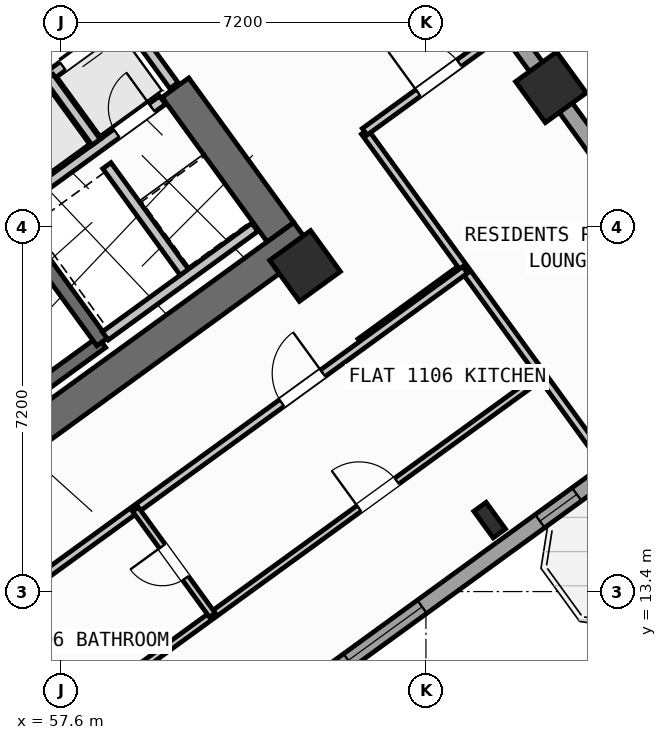
"""IFC4 building model, lengths in metres.
Left out: names, types, materials, properties, quantities, classifications, styles, units other than length and angle.
Written with IfcOpenShell. Run it as: python <this file> out.ifc"""

import sys

from ifc_helpers import new_model, si_unit, direction, frame, frame_2d, origin, origin_2d, place, context, subcontext, project, spatial, rectangle, hollow_rectangle, i_section, extrude, source, transform, mapped, element, fill, save


model = new_model("IFC4")
c1 = context("Model", 3, precision=1e-05, world=origin(), true_north=direction((0.0, 1.0)))
c2 = subcontext(c1, "Body", "Model", "MODEL_VIEW")
j1 = project(units=[si_unit("LENGTHUNIT", "METRE"), si_unit("PLANEANGLEUNIT", "RADIAN")], contexts=[c1])
p1 = place(None, origin())
s1 = spatial("IfcSite", under=j1, at=p1, CompositionType="ELEMENT")
p2 = place(p1, origin())
s2 = spatial("IfcBuilding", under=s1, at=p2, CompositionType="ELEMENT")
p3 = place(p2, frame((0.0, 0.0, 45.6)))
s3 = spatial("IfcBuildingStorey", under=s2, at=p3, CompositionType="ELEMENT", Elevation=45.6)
p4 = place(p3, frame((52.318, 13.11, 0.0), z_axis=(0.0, 0.0, 1.0), x_axis=(0.809019445368, 0.587781878776, 0.0)))
e1 = element("IfcWall", 1, at=p4, inside=s3, PredefinedType="SHEAR", context=c2, shape_type="SweptSolid", body=[
    extrude(rectangle(XDim=12.44, YDim=0.65, at=frame_2d((6.22, 0.0))), origin(), (0.0, 0.0, 1.0), 3.35),
])
p5 = place(p3, frame((61.929, 20.494, 0.0), z_axis=(0.0, 0.0, 1.0), x_axis=(-0.58782982593, 0.808984607855, 0.0)))
e2 = element("IfcWall", 2, at=p5, inside=s3, PredefinedType="SHEAR", context=c2, shape_type="SweptSolid", body=[
    extrude(rectangle(XDim=3.525, YDim=0.65, at=frame_2d((1.762, 0.0))), origin(), (0.0, 0.0, 1.0), 3.35),
])
m1 = source(origin(), c2, "Body", "SweptSolid", [
    extrude(i_section(OverallWidth=0.3, OverallDepth=0.65, WebThickness=0.016, FlangeThickness=0.031, at=origin_2d()), origin(), (0.0, 0.0, 1.0), 3.6),
])
p6 = place(p3, frame((66.058, 14.811, 0.0), z_axis=(0.0, 0.0, 1.0), x_axis=(0.809016994375, 0.587785252292, 0.0)))
e3 = element("IfcColumn", 3, at=p6, inside=s3, PredefinedType="COLUMN", context=c2, shape_type="MappedRepresentation", body=[
    mapped(m1, transform((0.0, 0.0, 0.0), scale=1.0)),
])
m2 = source(origin(), c2, "Body", "SweptSolid", [
    extrude(hollow_rectangle(XDim=1.0, YDim=1.0, WallThickness=0.04, at=origin_2d()), origin(), (0.0, 0.0, 1.0), 3.6),
])
for number, where, z_axis, x_axis in (
    (4, (62.414, 19.827, 0.0), (0.0, 0.0, 1.0), (0.809, 0.588, 0.0)),
    (5, (67.268, 23.354, 0.0), (0.0, 0.0, 1.0), (0.809, 0.588, 0.0)),
):
    element("IfcColumn", number, at=place(p3, frame(where, z_axis=z_axis, x_axis=x_axis)), inside=s3, PredefinedType="COLUMN", context=c2, shape_type="MappedRepresentation", body=[
        mapped(m2, transform((0.0, 0.0, 0.0), scale=1.0)),
    ])
p7 = place(p3, frame((58.455, 35.484, 0.0), z_axis=(0.0, 0.0, 1.0), x_axis=(0.587783625747, -0.809018176127, 0.0)))
e6 = element("IfcWall", 6, at=p7, inside=s3, PredefinedType="STANDARD", context=c2, shape_type="SweptSolid", body=[
    extrude(rectangle(XDim=21.587, YDim=0.32, at=frame_2d((10.794, 0.0))), origin(), (0.0, 0.0, 1.0), 2.725),
])
p8 = place(p7, frame((1.5, 0.0, 0.8)))
e7 = element("IfcOpeningElement", 7, at=p8, cuts=e6, PredefinedType="OPENING", context=c2, shape_type="SweptSolid", body=[
    extrude(rectangle(XDim=2.1, YDim=1.55, at=frame_2d((1.05, 0.775))), frame((0.0, 0.17, 0.0), z_axis=(0.0, -1.0, 0.0), x_axis=(1.0, 0.0, 0.0)), (0.0, 0.0, 1.0), 0.34),
])
p9 = place(p7, frame((5.105, 0.0, 0.85)))
e8 = element("IfcOpeningElement", 8, at=p9, cuts=e6, PredefinedType="OPENING", context=c2, shape_type="SweptSolid", body=[
    extrude(rectangle(XDim=1.5, YDim=1.5, at=frame_2d((0.75, 0.75))), frame((0.0, 0.17, 0.0), z_axis=(0.0, -1.0, 0.0), x_axis=(1.0, 0.0, 0.0)), (0.0, 0.0, 1.0), 0.34),
])
p10 = place(p7, frame((8.954, 0.0, 0.85)))
e9 = element("IfcOpeningElement", 9, at=p10, cuts=e6, PredefinedType="OPENING", context=c2, shape_type="SweptSolid", body=[
    extrude(rectangle(XDim=1.5, YDim=1.5, at=frame_2d((0.75, 0.75))), frame((0.0, 0.17, 0.0), z_axis=(0.0, -1.0, 0.0), x_axis=(1.0, 0.0, 0.0)), (0.0, 0.0, 1.0), 0.34),
])
p11 = place(p7, frame((17.581, 0.0, 0.95)))
e10 = element("IfcOpeningElement", 10, at=p11, cuts=e6, PredefinedType="OPENING", context=c2, shape_type="SweptSolid", body=[
    extrude(rectangle(XDim=1.2, YDim=1.4, at=frame_2d((0.6, 0.7))), frame((0.0, 0.17, 0.0), z_axis=(0.0, -1.0, 0.0), x_axis=(1.0, 0.0, 0.0)), (0.0, 0.0, 1.0), 0.34),
])
p12 = place(p3, frame((71.098, 17.731, 0.0), z_axis=(0.0, 0.0, 1.0), x_axis=(-0.809021120468, -0.587779573171, 0.0)))
e11 = element("IfcWall", 11, at=p12, inside=s3, PredefinedType="STANDARD", context=c2, shape_type="SweptSolid", body=[
    extrude(rectangle(XDim=17.588, YDim=0.32, at=frame_2d((8.794, 0.0))), origin(), (0.0, 0.0, 1.0), 3.35),
])
p13 = place(p12, frame((1.624, 0.0, 0.0)))
e12 = element("IfcOpeningElement", 12, at=p13, cuts=e11, PredefinedType="OPENING", context=c2, shape_type="SweptSolid", body=[
    extrude(rectangle(XDim=1.05, YDim=2.15, at=frame_2d((0.525, 1.075))), frame((0.0, 0.17, 0.0), z_axis=(0.0, -1.0, 0.0), x_axis=(1.0, 0.0, 0.0)), (0.0, 0.0, 1.0), 0.34),
])
p14 = place(p12, frame((4.104, 0.0, 1.0)))
e13 = element("IfcOpeningElement", 13, at=p14, cuts=e11, PredefinedType="OPENING", context=c2, shape_type="SweptSolid", body=[
    extrude(rectangle(XDim=0.9, YDim=1.25, at=frame_2d((0.45, 0.625))), frame((0.0, 0.17, 0.0), z_axis=(0.0, -1.0, 0.0), x_axis=(1.0, 0.0, 0.0)), (0.0, 0.0, 1.0), 0.34),
])
p15 = place(p12, frame((7.879, 0.0, 0.85)))
e14 = element("IfcOpeningElement", 14, at=p15, cuts=e11, PredefinedType="OPENING", context=c2, shape_type="SweptSolid", body=[
    extrude(rectangle(XDim=1.8, YDim=1.5, at=frame_2d((0.9, 0.75))), frame((0.0, 0.17, 0.0), z_axis=(0.0, -1.0, 0.0), x_axis=(1.0, 0.0, 0.0)), (0.0, 0.0, 1.0), 0.34),
])
p16 = place(p12, frame((12.849, 0.0, 0.85)))
e15 = element("IfcOpeningElement", 15, at=p16, cuts=e11, PredefinedType="OPENING", context=c2, shape_type="SweptSolid", body=[
    extrude(rectangle(XDim=1.8, YDim=1.5, at=frame_2d((0.9, 0.75))), frame((0.0, 0.17, 0.0), z_axis=(0.0, -1.0, 0.0), x_axis=(1.0, 0.0, 0.0)), (0.0, 0.0, 1.0), 0.34),
])
p17 = place(p3, frame((52.472, 14.013, 0.0), z_axis=(0.0, 0.0, 1.0), x_axis=(0.809028366311, 0.587769599847, 0.0)))
e16 = element("IfcWall", 16, at=p17, inside=s3, PredefinedType="SHEAR", context=c2, shape_type="SweptSolid", body=[
    extrude(rectangle(XDim=7.33, YDim=0.26, at=frame_2d((3.665, 0.0))), origin(), (0.0, 0.0, 1.0), 3.35),
])
p18 = place(p3, frame((58.41, 18.327, 0.0), z_axis=(0.0, 0.0, 1.0), x_axis=(-0.58776738483, 0.809029975545, 0.0)))
e17 = element("IfcWall", 17, at=p18, inside=s3, PredefinedType="SHEAR", context=c2, shape_type="SweptSolid", body=[
    extrude(rectangle(XDim=3.16, YDim=0.26, at=frame_2d((1.58, 0.0))), origin(), (0.0, 0.0, 1.0), 3.35),
])
p19 = place(p3, frame((56.553, 20.884, 0.0), z_axis=(0.0, 0.0, 1.0), x_axis=(0.809035789462, 0.587759382205, 0.0)))
e18 = element("IfcWall", 18, at=p19, inside=s3, PredefinedType="STANDARD", context=c2, shape_type="SweptSolid", body=[
    extrude(rectangle(XDim=3.768, YDim=0.2, at=frame_2d((1.884, 0.0))), origin(), (0.0, 0.0, 1.0), 3.34),
])
p20 = place(p19, frame((2.65, 0.0, 0.0)))
e19 = element("IfcOpeningElement", 19, at=p20, cuts=e18, PredefinedType="OPENING", context=c2, shape_type="SweptSolid", body=[
    extrude(rectangle(XDim=0.86, YDim=2.05, at=frame_2d((0.43, 1.025))), frame((0.0, 0.11, 0.0), z_axis=(0.0, -1.0, 0.0), x_axis=(1.0, 0.0, 0.0)), (0.0, 0.0, 1.0), 0.22),
])
p21 = place(p3, frame((54.421, 21.436, 0.0), z_axis=(0.0, 0.0, 1.0), x_axis=(0.809013710463, 0.587789772183, 0.0)))
e20 = element("IfcWall", 20, at=p21, inside=s3, PredefinedType="STANDARD", context=c2, shape_type="SweptSolid", body=[
    extrude(rectangle(XDim=5.36, YDim=0.2, at=frame_2d((2.68, 0.0))), origin(), (0.0, 0.0, 1.0), 3.34),
])
p22 = place(p21, frame((0.37, 0.0, 0.0)))
e21 = element("IfcOpeningElement", 21, at=p22, cuts=e20, PredefinedType="OPENING", context=c2, shape_type="SweptSolid", body=[
    extrude(rectangle(XDim=1.1, YDim=2.15, at=frame_2d((0.55, 1.075))), frame((0.0, 0.11, 0.0), z_axis=(0.0, -1.0, 0.0), x_axis=(1.0, 0.0, 0.0)), (0.0, 0.0, 1.0), 0.22),
])
p23 = place(p21, frame((2.17, 0.0, 0.0)))
e22 = element("IfcOpeningElement", 22, at=p23, cuts=e20, PredefinedType="OPENING", context=c2, shape_type="SweptSolid", body=[
    extrude(rectangle(XDim=1.1, YDim=2.15, at=frame_2d((0.55, 1.075))), frame((0.0, 0.11, 0.0), z_axis=(0.0, -1.0, 0.0), x_axis=(1.0, 0.0, 0.0)), (0.0, 0.0, 1.0), 0.22),
])
p24 = place(p21, frame((3.97, 0.0, 0.0)))
e23 = element("IfcOpeningElement", 23, at=p24, cuts=e20, PredefinedType="OPENING", context=c2, shape_type="SweptSolid", body=[
    extrude(rectangle(XDim=1.1, YDim=2.15, at=frame_2d((0.55, 1.075))), frame((0.0, 0.11, 0.0), z_axis=(0.0, -1.0, 0.0), x_axis=(1.0, 0.0, 0.0)), (0.0, 0.0, 1.0), 0.22),
])
p25 = place(p3, frame((58.29, 22.27, 0.0), z_axis=(0.0, 0.0, 1.0), x_axis=(-0.587840865826, 0.808976585857, 0.0)))
e24 = element("IfcWall", 24, at=p25, inside=s3, PredefinedType="STANDARD", context=c2, shape_type="SweptSolid", body=[
    extrude(rectangle(XDim=1.58, YDim=0.2, at=frame_2d((0.79, 0.0))), origin(), (0.0, 0.0, 1.0), 3.34),
])
p26 = place(p3, frame((60.067, 19.655, 0.0), z_axis=(0.0, 0.0, 1.0), x_axis=(-0.587800520745, 0.809005900975, 0.0)))
e25 = element("IfcWall", 25, at=p26, inside=s3, PredefinedType="STANDARD", context=c2, shape_type="SweptSolid", body=[
    extrude(rectangle(XDim=2.66, YDim=0.2, at=frame_2d((1.33, 0.0))), origin(), (0.0, 0.0, 1.0), 3.34),
])
p27 = place(p3, frame((58.472, 18.447, 0.0), z_axis=(0.0, 0.0, 1.0), x_axis=(0.809022487728, 0.587777691266, 0.0)))
e26 = element("IfcWall", 26, at=p27, inside=s3, PredefinedType="STANDARD", context=c2, shape_type="SweptSolid", body=[
    extrude(rectangle(XDim=3.648, YDim=0.2, at=frame_2d((1.824, 0.0))), origin(), (0.0, 0.0, 1.0), 3.34),
])
p28 = place(p3, frame((53.425, 22.468, 0.0), z_axis=(0.0, 0.0, 1.0), x_axis=(0.80902705128, 0.587771409902, 0.0)))
e27 = element("IfcWall", 27, at=p28, inside=s3, PredefinedType="STANDARD", context=c2, shape_type="SweptSolid", body=[
    extrude(rectangle(XDim=5.368, YDim=0.2, at=frame_2d((2.684, 0.0))), origin(), (0.0, 0.0, 1.0), 3.34),
])
p29 = place(p28, frame((4.28, 0.0, 0.0)))
e28 = element("IfcOpeningElement", 28, at=p29, cuts=e27, PredefinedType="OPENING", context=c2, shape_type="SweptSolid", body=[
    extrude(rectangle(XDim=0.86, YDim=2.05, at=frame_2d((0.43, 1.025))), frame((0.0, 0.11, 0.0), z_axis=(0.0, -1.0, 0.0), x_axis=(1.0, 0.0, 0.0)), (0.0, 0.0, 1.0), 0.22),
])
p30 = place(p28, frame((1.45, 0.0, 0.0)))
e29 = element("IfcOpeningElement", 29, at=p30, cuts=e27, PredefinedType="OPENING", context=c2, shape_type="SweptSolid", body=[
    extrude(rectangle(XDim=0.86, YDim=2.05, at=frame_2d((0.43, 1.025))), frame((0.0, 0.11, 0.0), z_axis=(0.0, -1.0, 0.0), x_axis=(1.0, 0.0, 0.0)), (0.0, 0.0, 1.0), 0.22),
])
p31 = place(p3, frame((59.827, 23.386, 0.0), z_axis=(0.0, 0.0, 1.0), x_axis=(-0.587803840107, 0.809003489211, 0.0)))
e30 = element("IfcWall", 30, at=p31, inside=s3, PredefinedType="STANDARD", context=c2, shape_type="SweptSolid", body=[
    extrude(rectangle(XDim=2.96, YDim=0.2, at=frame_2d((1.48, 0.0))), origin(), (0.0, 0.0, 1.0), 3.34),
])
p32 = place(p31, frame((1.68, 0.0, 0.0)))
e31 = element("IfcOpeningElement", 31, at=p32, cuts=e30, PredefinedType="OPENING", context=c2, shape_type="SweptSolid", body=[
    extrude(rectangle(XDim=1.0, YDim=2.1, at=frame_2d((0.5, 1.05))), frame((0.0, 0.11, 0.0), z_axis=(0.0, -1.0, 0.0), x_axis=(1.0, 0.0, 0.0)), (0.0, 0.0, 1.0), 0.22),
])
p33 = place(p3, frame((63.507, 18.322, 0.0), z_axis=(0.0, 0.0, 1.0), x_axis=(0.809034604122, 0.587761013791, 0.0)))
e32 = element("IfcWall", 32, at=p33, inside=s3, PredefinedType="PARTITIONING", context=c2, shape_type="SweptSolid", body=[
    extrude(rectangle(XDim=2.51, YDim=0.16, at=frame_2d((1.255, 0.0))), origin(), (0.0, 0.0, 1.0), 3.34),
])
p34 = place(p3, frame((68.353, 15.922, 0.0), z_axis=(0.0, 0.0, 1.0), x_axis=(-0.58776839458, 0.809029241952, 0.0)))
e33 = element("IfcWall", 33, at=p34, inside=s3, PredefinedType="PARTITIONING", context=c2, shape_type="SweptSolid", body=[
    extrude(rectangle(XDim=8.1, YDim=0.16, at=frame_2d((4.05, 0.0))), origin(), (0.0, 0.0, 1.0), 3.34),
])
p35 = place(p3, frame((63.592, 22.475, 0.0), z_axis=(0.0, 0.0, 1.0), x_axis=(0.809035546126, 0.58775971715, 0.0)))
e34 = element("IfcWall", 34, at=p35, inside=s3, PredefinedType="PARTITIONING", context=c2, shape_type="SweptSolid", body=[
    extrude(rectangle(XDim=3.63, YDim=0.16, at=frame_2d((1.815, 0.0))), origin(), (0.0, 0.0, 1.0), 3.34),
])
p36 = place(p35, frame((1.305, 0.0, 0.0)))
e35 = element("IfcOpeningElement", 35, at=p36, cuts=e34, PredefinedType="OPENING", context=c2, shape_type="SweptSolid", body=[
    extrude(rectangle(XDim=1.0, YDim=2.1, at=frame_2d((0.5, 1.05))), frame((0.0, 0.09, 0.0), z_axis=(0.0, -1.0, 0.0), x_axis=(1.0, 0.0, 0.0)), (0.0, 0.0, 1.0), 0.18),
])
p37 = place(p3, frame((53.705, 11.126, 0.0), z_axis=(0.0, 0.0, 1.0), x_axis=(0.809014504436, 0.587788679384, 0.0)))
e36 = element("IfcWall", 36, at=p37, inside=s3, PredefinedType="PARTITIONING", context=c2, shape_type="SweptSolid", body=[
    extrude(rectangle(XDim=14.67, YDim=0.16, at=frame_2d((7.335, 0.0))), origin(), (0.0, 0.0, 1.0), 3.34),
])
p38 = place(p37, frame((10.2, 0.0, 0.0)))
e37 = element("IfcOpeningElement", 37, at=p38, cuts=e36, PredefinedType="OPENING", context=c2, shape_type="SweptSolid", body=[
    extrude(rectangle(XDim=1.0, YDim=2.1, at=frame_2d((0.5, 1.05))), frame((0.0, 0.09, 0.0), z_axis=(0.0, -1.0, 0.0), x_axis=(1.0, 0.0, 0.0)), (0.0, 0.0, 1.0), 0.18),
])
p39 = place(p3, frame((57.747, 7.586, 0.0), z_axis=(0.0, 0.0, 1.0), x_axis=(-0.587784893399, 0.809017255126, 0.0)))
e38 = element("IfcWall", 38, at=p39, inside=s3, PredefinedType="PARTITIONING", context=c2, shape_type="SweptSolid", body=[
    extrude(rectangle(XDim=5.48, YDim=0.16, at=frame_2d((2.74, 0.0))), origin(), (0.0, 0.0, 1.0), 3.34),
])
p40 = place(p3, frame((56.249, 9.785, 0.0), z_axis=(0.0, 0.0, 1.0), x_axis=(0.809011747655, 0.587792473715, 0.0)))
e39 = element("IfcWall", 39, at=p40, inside=s3, PredefinedType="PLUMBINGWALL", context=c2, shape_type="SweptSolid", body=[
    extrude(rectangle(XDim=13.4, YDim=0.14, at=frame_2d((6.7, 0.0))), origin(), (0.0, 0.0, 1.0), 3.34),
])
p41 = place(p40, frame((8.94, 0.0, 0.0)))
e40 = element("IfcOpeningElement", 40, at=p41, cuts=e39, PredefinedType="OPENING", context=c2, shape_type="SweptSolid", body=[
    extrude(rectangle(XDim=0.92, YDim=2.08, at=frame_2d((0.46, 1.04))), frame((0.0, 0.08, 0.0), z_axis=(0.0, -1.0, 0.0), x_axis=(1.0, 0.0, 0.0)), (0.0, 0.0, 1.0), 0.16),
])
p42 = place(p3, frame((60.585, 12.936, 0.0), z_axis=(0.0, 0.0, 1.0), x_axis=(-0.587772116736, 0.809026537752, 0.0)))
e41 = element("IfcWall", 41, at=p42, inside=s3, PredefinedType="PLUMBINGWALL", context=c2, shape_type="SweptSolid", body=[
    extrude(rectangle(XDim=2.58, YDim=0.14, at=frame_2d((1.29, 0.0))), origin(), (0.0, 0.0, 1.0), 3.34),
])
p43 = place(p42, frame((0.9, 0.0, 0.0)))
e42 = element("IfcOpeningElement", 42, at=p43, cuts=e41, PredefinedType="OPENING", context=c2, shape_type="SweptSolid", body=[
    extrude(rectangle(XDim=0.78, YDim=2.05, at=frame_2d((0.39, 1.025))), frame((0.0, 0.08, 0.0), z_axis=(0.0, -1.0, 0.0), x_axis=(1.0, 0.0, 0.0)), (0.0, 0.0, 1.0), 0.16),
])
m3 = source(origin(), c2, "Body", "SweptSolid", [
    extrude(rectangle(XDim=0.9, YDim=1.25, at=frame_2d((0.45, 0.625))), frame((0.0, 0.03, 0.0), z_axis=(0.0, -1.0, 0.0), x_axis=(1.0, 0.0, 0.0)), (0.0, 0.0, 1.0), 0.06),
])
p44 = place(p14, origin())
e43 = element("IfcWindow", 43, at=p44, inside=s3, PartitioningType="SINGLE_PANEL", PredefinedType="WINDOW", context=c2, shape_type="MappedRepresentation", body=[
    mapped(m3, transform((0.0, 0.0, 0.0), scale=1.0)),
])
fill(e13, e43)
m4 = source(origin(), c2, "Body", "SweptSolid", [
    extrude(rectangle(XDim=1.8, YDim=1.5, at=frame_2d((0.9, 0.75))), frame((0.0, 0.03, 0.0), z_axis=(0.0, -1.0, 0.0), x_axis=(1.0, 0.0, 0.0)), (0.0, 0.0, 1.0), 0.06),
])
p45 = place(p15, origin())
e44 = element("IfcWindow", 44, at=p45, inside=s3, PartitioningType="SINGLE_PANEL", PredefinedType="WINDOW", context=c2, shape_type="MappedRepresentation", body=[
    mapped(m4, transform((0.0, 0.0, 0.0), scale=1.0)),
])
fill(e14, e44)
m5 = source(origin(), c2, "Body", "SweptSolid", [
    extrude(rectangle(XDim=1.1, YDim=2.15, at=frame_2d((0.55, 1.075))), frame((0.0, 0.025, 0.0), z_axis=(0.0, -1.0, 0.0), x_axis=(1.0, 0.0, 0.0)), (0.0, 0.0, 1.0), 0.05),
])
p46 = place(p24, origin())
e45 = element("IfcDoor", 45, at=p46, inside=s3, OperationType="DOUBLE_DOOR_SLIDING", PredefinedType="DOOR", context=c2, shape_type="MappedRepresentation", body=[
    mapped(m5, transform((0.0, 0.0, 0.0), scale=1.0)),
])
fill(e23, e45)
m6 = source(origin(), c2, "Body", "SweptSolid", [
    extrude(rectangle(XDim=0.86, YDim=2.05, at=frame_2d((0.43, 1.025))), frame((0.0, 0.025, 0.0), z_axis=(0.0, -1.0, 0.0), x_axis=(1.0, 0.0, 0.0)), (0.0, 0.0, 1.0), 0.05),
])
p47 = place(p20, origin())
e46 = element("IfcDoor", 46, at=p47, inside=s3, OperationType="SINGLE_SWING_RIGHT", PredefinedType="DOOR", context=c2, shape_type="MappedRepresentation", body=[
    mapped(m6, transform((0.0, 0.0, 0.0), scale=1.0)),
])
fill(e19, e46)
m7 = source(origin(), c2, "Body", "SweptSolid", [
    extrude(rectangle(XDim=1.0, YDim=2.1, at=frame_2d((0.5, 1.05))), frame((0.0, 0.025, 0.0), z_axis=(0.0, -1.0, 0.0), x_axis=(1.0, 0.0, 0.0)), (0.0, 0.0, 1.0), 0.05),
])
p48 = place(p36, origin())
e47 = element("IfcDoor", 47, at=p48, inside=s3, OperationType="SINGLE_SWING_LEFT", PredefinedType="DOOR", context=c2, shape_type="MappedRepresentation", body=[
    mapped(m7, transform((0.0, 0.0, 0.0), scale=1.0)),
])
fill(e35, e47)
p49 = place(p38, origin())
e48 = element("IfcDoor", 48, at=p49, inside=s3, OperationType="SINGLE_SWING_RIGHT", PredefinedType="DOOR", context=c2, shape_type="MappedRepresentation", body=[
    mapped(m7, transform((0.0, 0.0, 0.0), scale=1.0)),
])
fill(e37, e48)
m8 = source(origin(), c2, "Body", "SweptSolid", [
    extrude(rectangle(XDim=0.92, YDim=2.08, at=frame_2d((0.46, 1.04))), frame((0.0, 0.025, 0.0), z_axis=(0.0, -1.0, 0.0), x_axis=(1.0, 0.0, 0.0)), (0.0, 0.0, 1.0), 0.05),
])
p50 = place(p41, origin())
e49 = element("IfcDoor", 49, at=p50, inside=s3, OperationType="SINGLE_SWING_LEFT", PredefinedType="DOOR", context=c2, shape_type="MappedRepresentation", body=[
    mapped(m8, transform((0.0, 0.0, 0.0), scale=1.0)),
])
fill(e40, e49)
m9 = source(origin(), c2, "Body", "SweptSolid", [
    extrude(rectangle(XDim=0.78, YDim=2.05, at=frame_2d((0.39, 1.025))), frame((0.0, 0.025, 0.0), z_axis=(0.0, -1.0, 0.0), x_axis=(1.0, 0.0, 0.0)), (0.0, 0.0, 1.0), 0.05),
])
p51 = place(p43, origin())
e50 = element("IfcDoor", 50, at=p51, inside=s3, OperationType="SINGLE_SWING_RIGHT", PredefinedType="DOOR", context=c2, shape_type="MappedRepresentation", body=[
    mapped(m9, transform((0.0, 0.0, 0.0), scale=1.0)),
])
fill(e42, e50)
save(model, sys.argv[1])
